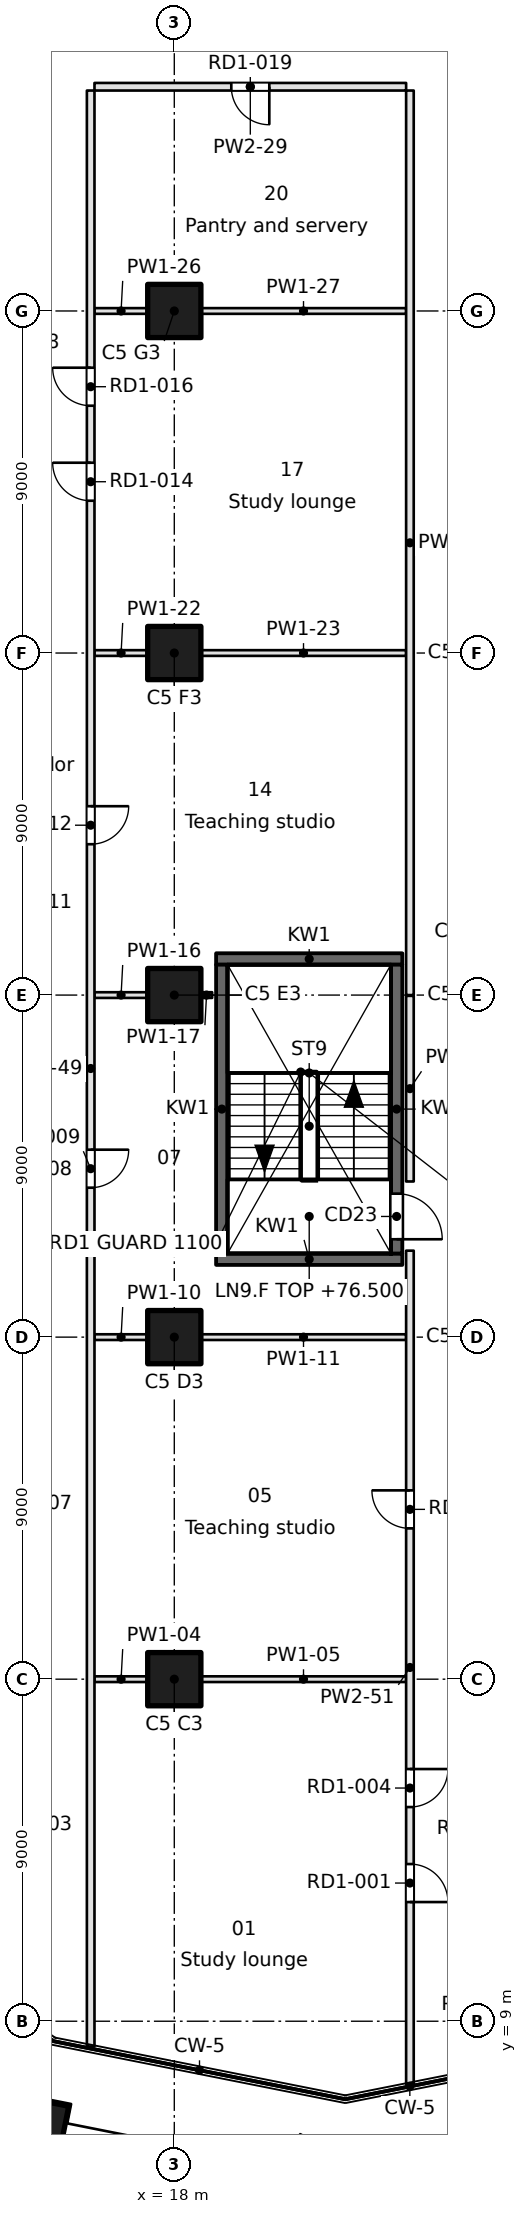
"""IFC4 building model, lengths in metres.
Left out: names, types, materials, properties, quantities, classifications, styles, units other than length and angle.
Written with IfcOpenShell. Run it as: python <this file> out.ifc"""

import sys

from ifc_helpers import new_model, si_unit, direction, frame, frame_2d, origin, origin_2d, place, context, subcontext, project, spatial, rectangle, extrude, element, fill, save


model = new_model("IFC4")
c1 = context("Model", 3, precision=1e-05, world=origin(), true_north=direction((0.0, 1.0)))
c2 = subcontext(c1, "Body", "Model", "MODEL_VIEW")
j1 = project(units=[si_unit("LENGTHUNIT", "METRE"), si_unit("PLANEANGLEUNIT", "RADIAN")], contexts=[c1])
p1 = place(None, origin())
s1 = spatial("IfcSite", under=j1, at=p1, CompositionType="ELEMENT")
p2 = place(p1, origin())
s2 = spatial("IfcBuilding", under=s1, at=p2, CompositionType="ELEMENT")
p3 = place(p2, frame((0.0, 0.0, 76.5)))
s3 = spatial("IfcBuildingStorey", under=s2, at=p3, CompositionType="ELEMENT", Elevation=76.5)
p4 = place(p3, frame((13.89, 6.213, 0.0), z_axis=(0.0, 0.0, 1.0), x_axis=(-0.980785280403, 0.195090322016, 0.0)))
e1 = element("IfcColumn", 1, at=p4, inside=s3, PredefinedType="COLUMN", context=c2, shape_type="SweptSolid", body=[
    extrude(rectangle(XDim=2.4, YDim=1.6, at=origin_2d()), origin(), (0.0, 0.0, 1.0), 3.7),
])
for number, where, z_axis, x_axis in (
    (2, (18.0, 18.0, 0.0), (0.0, 0.0, 1.0), (1.0, 0.0, 0.0)),
    (3, (18.0, 27.0, 0.0), (0.0, 0.0, 1.0), (1.0, 0.0, 0.0)),
    (4, (18.0, 36.0, 0.0), (0.0, 0.0, 1.0), (1.0, 0.0, 0.0)),
    (5, (18.0, 45.0, 0.0), (0.0, 0.0, 1.0), (1.0, 0.0, 0.0)),
    (6, (18.0, 54.0, 0.0), (0.0, 0.0, 1.0), (1.0, 0.0, 0.0)),
):
    element("IfcColumn", number, at=place(p3, frame(where, z_axis=z_axis, x_axis=x_axis)), inside=s3, PredefinedType="COLUMN", context=c2, shape_type="SweptSolid", body=[
        extrude(rectangle(XDim=1.4, YDim=1.4, at=origin_2d()), origin(), (0.0, 0.0, 1.0), 3.7),
    ])
for number, where, z_axis, x_axis in (
    (7, (19.1, 29.05, -0.4), (0.0, 0.0, 1.0), (1.0, 0.0, 0.0)),
    (8, (19.1, 36.95, -0.4), (0.0, 0.0, 1.0), (1.0, 0.0, 0.0)),
):
    element("IfcWall", number, at=place(p3, frame(where, z_axis=z_axis, x_axis=x_axis)), inside=s3, PredefinedType="SOLIDWALL", context=c2, shape_type="SweptSolid", body=[
        extrude(rectangle(XDim=4.9, YDim=0.3, at=frame_2d((2.45, 0.0))), origin(), (0.0, 0.0, 1.0), 3.65),
    ])
p5 = place(p3, frame((19.25, 29.2, -0.4), z_axis=(0.0, 0.0, 1.0), x_axis=(0.0, 1.0, 0.0)))
e9 = element("IfcWall", 9, at=p5, inside=s3, PredefinedType="SOLIDWALL", context=c2, shape_type="SweptSolid", body=[
    extrude(rectangle(XDim=7.6, YDim=0.3, at=frame_2d((3.8, 0.0))), origin(), (0.0, 0.0, 1.0), 3.65),
])
p6 = place(p3, frame((23.85, 29.2, -0.4), z_axis=(0.0, 0.0, 1.0), x_axis=(0.0, 1.0, 0.0)))
e10 = element("IfcWall", 10, at=p6, inside=s3, PredefinedType="SOLIDWALL", context=c2, shape_type="SweptSolid", body=[
    extrude(rectangle(XDim=7.6, YDim=0.3, at=frame_2d((3.8, 0.0))), origin(), (0.0, 0.0, 1.0), 3.65),
])
p7 = place(p6, frame((0.375, 0.0, 0.4)))
e11 = element("IfcOpeningElement", 11, at=p7, cuts=e10, PredefinedType="OPENING", context=c2, shape_type="SweptSolid", body=[
    extrude(rectangle(XDim=1.2, YDim=2.1, at=frame_2d((0.6, 1.05))), frame((0.0, 0.15, 0.0), z_axis=(0.0, -1.0, 0.0), x_axis=(1.0, 0.0, 0.0)), (0.0, 0.0, 1.0), 0.3),
])
p8 = place(p3, frame((15.9, 18.0, 0.0), z_axis=(0.0, 0.0, 1.0), x_axis=(1.0, 0.0, 0.0)))
e12 = element("IfcWall", 12, at=p8, inside=s3, PredefinedType="PARTITIONING", context=c2, shape_type="SweptSolid", body=[
    extrude(rectangle(XDim=1.4, YDim=0.15, at=frame_2d((0.7, 0.0))), origin(), (0.0, 0.0, 1.0), 3.25),
])
p9 = place(p3, frame((18.7, 18.0, 0.0), z_axis=(0.0, 0.0, 1.0), x_axis=(1.0, 0.0, 0.0)))
e13 = element("IfcWall", 13, at=p9, inside=s3, PredefinedType="PARTITIONING", context=c2, shape_type="SweptSolid", body=[
    extrude(rectangle(XDim=5.4, YDim=0.15, at=frame_2d((2.7, 0.0))), origin(), (0.0, 0.0, 1.0), 3.25),
])
p10 = place(p3, frame((15.9, 27.0, 0.0), z_axis=(0.0, 0.0, 1.0), x_axis=(1.0, 0.0, 0.0)))
e14 = element("IfcWall", 14, at=p10, inside=s3, PredefinedType="PARTITIONING", context=c2, shape_type="SweptSolid", body=[
    extrude(rectangle(XDim=1.4, YDim=0.15, at=frame_2d((0.7, 0.0))), origin(), (0.0, 0.0, 1.0), 3.25),
])
p11 = place(p3, frame((18.7, 27.0, 0.0), z_axis=(0.0, 0.0, 1.0), x_axis=(1.0, 0.0, 0.0)))
e15 = element("IfcWall", 15, at=p11, inside=s3, PredefinedType="PARTITIONING", context=c2, shape_type="SweptSolid", body=[
    extrude(rectangle(XDim=5.4, YDim=0.15, at=frame_2d((2.7, 0.0))), origin(), (0.0, 0.0, 1.0), 3.25),
])
p12 = place(p3, frame((15.9, 36.0, 0.0), z_axis=(0.0, 0.0, 1.0), x_axis=(1.0, 0.0, 0.0)))
e16 = element("IfcWall", 16, at=p12, inside=s3, PredefinedType="PARTITIONING", context=c2, shape_type="SweptSolid", body=[
    extrude(rectangle(XDim=1.4, YDim=0.15, at=frame_2d((0.7, 0.0))), origin(), (0.0, 0.0, 1.0), 3.25),
])
p13 = place(p3, frame((18.7, 36.0, 0.0), z_axis=(0.0, 0.0, 1.0), x_axis=(1.0, 0.0, 0.0)))
e17 = element("IfcWall", 17, at=p13, inside=s3, PredefinedType="PARTITIONING", context=c2, shape_type="SweptSolid", body=[
    extrude(rectangle(XDim=0.296, YDim=0.15, at=frame_2d((0.148, 0.0))), origin(), (0.0, 0.0, 1.0), 3.25),
])
p14 = place(p3, frame((15.9, 45.0, 0.0), z_axis=(0.0, 0.0, 1.0), x_axis=(1.0, 0.0, 0.0)))
e18 = element("IfcWall", 18, at=p14, inside=s3, PredefinedType="PARTITIONING", context=c2, shape_type="SweptSolid", body=[
    extrude(rectangle(XDim=1.4, YDim=0.15, at=frame_2d((0.7, 0.0))), origin(), (0.0, 0.0, 1.0), 3.25),
])
p15 = place(p3, frame((18.7, 45.0, 0.0), z_axis=(0.0, 0.0, 1.0), x_axis=(1.0, 0.0, 0.0)))
e19 = element("IfcWall", 19, at=p15, inside=s3, PredefinedType="PARTITIONING", context=c2, shape_type="SweptSolid", body=[
    extrude(rectangle(XDim=5.4, YDim=0.15, at=frame_2d((2.7, 0.0))), origin(), (0.0, 0.0, 1.0), 3.25),
])
p16 = place(p3, frame((15.9, 54.0, 0.0), z_axis=(0.0, 0.0, 1.0), x_axis=(1.0, 0.0, 0.0)))
e20 = element("IfcWall", 20, at=p16, inside=s3, PredefinedType="PARTITIONING", context=c2, shape_type="SweptSolid", body=[
    extrude(rectangle(XDim=1.4, YDim=0.15, at=frame_2d((0.7, 0.0))), origin(), (0.0, 0.0, 1.0), 3.25),
])
p17 = place(p3, frame((18.7, 54.0, 0.0), z_axis=(0.0, 0.0, 1.0), x_axis=(1.0, 0.0, 0.0)))
e21 = element("IfcWall", 21, at=p17, inside=s3, PredefinedType="PARTITIONING", context=c2, shape_type="SweptSolid", body=[
    extrude(rectangle(XDim=5.4, YDim=0.15, at=frame_2d((2.7, 0.0))), origin(), (0.0, 0.0, 1.0), 3.25),
])
p18 = place(p3, frame((24.1, 59.9, 0.0), z_axis=(0.0, 0.0, 1.0), x_axis=(-1.0, 0.0, 0.0)))
e22 = element("IfcWall", 22, at=p18, inside=s3, PredefinedType="PARTITIONING", context=c2, shape_type="SweptSolid", body=[
    extrude(rectangle(XDim=8.2, YDim=0.2, at=frame_2d((4.1, 0.0))), origin(), (0.0, 0.0, 1.0), 3.25),
])
p19 = place(p18, frame((3.6, 0.0, 0.0)))
e23 = element("IfcOpeningElement", 23, at=p19, cuts=e22, PredefinedType="OPENING", context=c2, shape_type="SweptSolid", body=[
    extrude(rectangle(XDim=1.0, YDim=2.1, at=frame_2d((0.5, 1.05))), frame((0.0, 0.1, 0.0), z_axis=(0.0, -1.0, 0.0), x_axis=(1.0, 0.0, 0.0)), (0.0, 0.0, 1.0), 0.2),
])
p20 = place(p3, frame((15.8, 59.8, 0.0), z_axis=(0.0, 0.0, 1.0), x_axis=(0.0, -1.0, 0.0)))
e24 = element("IfcWall", 24, at=p20, inside=s3, PredefinedType="PARTITIONING", context=c2, shape_type="SweptSolid", body=[
    extrude(rectangle(XDim=51.464, YDim=0.2, at=frame_2d((25.732, 0.0))), origin(), (0.0, 0.0, 1.0), 3.25),
])
p21 = place(p20, frame((27.868, 0.0, 0.0)))
e25 = element("IfcOpeningElement", 25, at=p21, cuts=e24, PredefinedType="OPENING", context=c2, shape_type="SweptSolid", body=[
    extrude(rectangle(XDim=1.0, YDim=2.1, at=frame_2d((0.5, 1.05))), frame((0.0, 0.1, 0.0), z_axis=(0.0, -1.0, 0.0), x_axis=(1.0, 0.0, 0.0)), (0.0, 0.0, 1.0), 0.2),
])
p22 = place(p20, frame((18.831, 0.0, 0.0)))
e26 = element("IfcOpeningElement", 26, at=p22, cuts=e24, PredefinedType="OPENING", context=c2, shape_type="SweptSolid", body=[
    extrude(rectangle(XDim=1.0, YDim=2.1, at=frame_2d((0.5, 1.05))), frame((0.0, 0.1, 0.0), z_axis=(0.0, -1.0, 0.0), x_axis=(1.0, 0.0, 0.0)), (0.0, 0.0, 1.0), 0.2),
])
p23 = place(p20, frame((9.793, 0.0, 0.0)))
e27 = element("IfcOpeningElement", 27, at=p23, cuts=e24, PredefinedType="OPENING", context=c2, shape_type="SweptSolid", body=[
    extrude(rectangle(XDim=1.0, YDim=2.1, at=frame_2d((0.5, 1.05))), frame((0.0, 0.1, 0.0), z_axis=(0.0, -1.0, 0.0), x_axis=(1.0, 0.0, 0.0)), (0.0, 0.0, 1.0), 0.2),
])
p24 = place(p20, frame((7.293, 0.0, 0.0)))
e28 = element("IfcOpeningElement", 28, at=p24, cuts=e24, PredefinedType="OPENING", context=c2, shape_type="SweptSolid", body=[
    extrude(rectangle(XDim=1.0, YDim=2.1, at=frame_2d((0.5, 1.05))), frame((0.0, 0.1, 0.0), z_axis=(0.0, -1.0, 0.0), x_axis=(1.0, 0.0, 0.0)), (0.0, 0.0, 1.0), 0.2),
])
p25 = place(p3, frame((24.2, 31.095, 0.0), z_axis=(0.0, 0.0, 1.0), x_axis=(0.0, 1.0, 0.0)))
e29 = element("IfcWall", 29, at=p25, inside=s3, PredefinedType="PARTITIONING", context=c2, shape_type="SweptSolid", body=[
    extrude(rectangle(XDim=4.884, YDim=0.2, at=frame_2d((2.442, 0.0))), origin(), (0.0, 0.0, 1.0), 3.25),
])
p26 = place(p3, frame((24.2, 7.341, 0.0), z_axis=(0.0, 0.0, 1.0), x_axis=(0.0, 1.0, 0.0)))
e30 = element("IfcWall", 30, at=p26, inside=s3, PredefinedType="PARTITIONING", context=c2, shape_type="SweptSolid", body=[
    extrude(rectangle(XDim=21.934, YDim=0.2, at=frame_2d((10.967, 0.0))), origin(), (0.0, 0.0, 1.0), 3.25),
])
p27 = place(p26, frame((4.794, 0.0, 0.0)))
e31 = element("IfcOpeningElement", 31, at=p27, cuts=e30, PredefinedType="OPENING", context=c2, shape_type="SweptSolid", body=[
    extrude(rectangle(XDim=1.0, YDim=2.1, at=frame_2d((0.5, 1.05))), frame((0.0, 0.1, 0.0), z_axis=(0.0, -1.0, 0.0), x_axis=(1.0, 0.0, 0.0)), (0.0, 0.0, 1.0), 0.2),
])
p28 = place(p26, frame((7.294, 0.0, 0.0)))
e32 = element("IfcOpeningElement", 32, at=p28, cuts=e30, PredefinedType="OPENING", context=c2, shape_type="SweptSolid", body=[
    extrude(rectangle(XDim=1.0, YDim=2.1, at=frame_2d((0.5, 1.05))), frame((0.0, 0.1, 0.0), z_axis=(0.0, -1.0, 0.0), x_axis=(1.0, 0.0, 0.0)), (0.0, 0.0, 1.0), 0.2),
])
p29 = place(p26, frame((14.627, 0.0, 0.0)))
e33 = element("IfcOpeningElement", 33, at=p29, cuts=e30, PredefinedType="OPENING", context=c2, shape_type="SweptSolid", body=[
    extrude(rectangle(XDim=1.0, YDim=2.1, at=frame_2d((0.5, 1.05))), frame((0.0, 0.1, 0.0), z_axis=(0.0, -1.0, 0.0), x_axis=(1.0, 0.0, 0.0)), (0.0, 0.0, 1.0), 0.2),
])
p30 = place(p3, frame((24.2, 36.0, 0.0), z_axis=(0.0, 0.0, 1.0), x_axis=(0.0, 1.0, 0.0)))
e34 = element("IfcWall", 34, at=p30, inside=s3, PredefinedType="PARTITIONING", context=c2, shape_type="SweptSolid", body=[
    extrude(rectangle(XDim=23.8, YDim=0.2, at=frame_2d((11.9, 0.0))), origin(), (0.0, 0.0, 1.0), 3.25),
])
p31 = place(p7, frame((1.2, 0.0, 0.0), z_axis=(0.0, 0.0, 1.0), x_axis=(-1.0, 0.0, 0.0)))
e35 = element("IfcDoor", 35, at=p31, inside=s3, OperationType="SINGLE_SWING_RIGHT", PredefinedType="DOOR", context=c2, shape_type="SweptSolid", body=[
    extrude(rectangle(XDim=1.2, YDim=2.1, at=frame_2d((0.6, 1.05))), frame((0.0, 0.025, 0.0), z_axis=(0.0, -1.0, 0.0), x_axis=(1.0, 0.0, 0.0)), (0.0, 0.0, 1.0), 0.05),
])
fill(e11, e35)
p32 = place(p27, frame((1.0, 0.0, 0.0), z_axis=(0.0, 0.0, 1.0), x_axis=(-1.0, 0.0, 0.0)))
e36 = element("IfcDoor", 36, at=p32, inside=s3, OperationType="SINGLE_SWING_RIGHT", PredefinedType="DOOR", context=c2, shape_type="SweptSolid", body=[
    extrude(rectangle(XDim=1.0, YDim=2.1, at=frame_2d((0.5, 1.05))), frame((0.0, 0.025, 0.0), z_axis=(0.0, -1.0, 0.0), x_axis=(1.0, 0.0, 0.0)), (0.0, 0.0, 1.0), 0.05),
])
fill(e31, e36)
p33 = place(p28, frame((1.0, 0.0, 0.0), z_axis=(0.0, 0.0, 1.0), x_axis=(-1.0, 0.0, 0.0)))
e37 = element("IfcDoor", 37, at=p33, inside=s3, OperationType="SINGLE_SWING_LEFT", PredefinedType="DOOR", context=c2, shape_type="SweptSolid", body=[
    extrude(rectangle(XDim=1.0, YDim=2.1, at=frame_2d((0.5, 1.05))), frame((0.0, 0.025, 0.0), z_axis=(0.0, -1.0, 0.0), x_axis=(1.0, 0.0, 0.0)), (0.0, 0.0, 1.0), 0.05),
])
fill(e32, e37)
p34 = place(p29, origin())
e38 = element("IfcDoor", 38, at=p34, inside=s3, OperationType="SINGLE_SWING_RIGHT", PredefinedType="DOOR", context=c2, shape_type="SweptSolid", body=[
    extrude(rectangle(XDim=1.0, YDim=2.1, at=frame_2d((0.5, 1.05))), frame((0.0, 0.025, 0.0), z_axis=(0.0, -1.0, 0.0), x_axis=(1.0, 0.0, 0.0)), (0.0, 0.0, 1.0), 0.05),
])
fill(e33, e38)
p35 = place(p21, origin())
e39 = element("IfcDoor", 39, at=p35, inside=s3, OperationType="SINGLE_SWING_LEFT", PredefinedType="DOOR", context=c2, shape_type="SweptSolid", body=[
    extrude(rectangle(XDim=1.0, YDim=2.1, at=frame_2d((0.5, 1.05))), frame((0.0, 0.025, 0.0), z_axis=(0.0, -1.0, 0.0), x_axis=(1.0, 0.0, 0.0)), (0.0, 0.0, 1.0), 0.05),
])
fill(e25, e39)
p36 = place(p22, origin())
e40 = element("IfcDoor", 40, at=p36, inside=s3, OperationType="SINGLE_SWING_LEFT", PredefinedType="DOOR", context=c2, shape_type="SweptSolid", body=[
    extrude(rectangle(XDim=1.0, YDim=2.1, at=frame_2d((0.5, 1.05))), frame((0.0, 0.025, 0.0), z_axis=(0.0, -1.0, 0.0), x_axis=(1.0, 0.0, 0.0)), (0.0, 0.0, 1.0), 0.05),
])
fill(e26, e40)
p37 = place(p23, frame((1.0, 0.0, 0.0), z_axis=(0.0, 0.0, 1.0), x_axis=(-1.0, 0.0, 0.0)))
e41 = element("IfcDoor", 41, at=p37, inside=s3, OperationType="SINGLE_SWING_RIGHT", PredefinedType="DOOR", context=c2, shape_type="SweptSolid", body=[
    extrude(rectangle(XDim=1.0, YDim=2.1, at=frame_2d((0.5, 1.05))), frame((0.0, 0.025, 0.0), z_axis=(0.0, -1.0, 0.0), x_axis=(1.0, 0.0, 0.0)), (0.0, 0.0, 1.0), 0.05),
])
fill(e27, e41)
p38 = place(p24, frame((1.0, 0.0, 0.0), z_axis=(0.0, 0.0, 1.0), x_axis=(-1.0, 0.0, 0.0)))
e42 = element("IfcDoor", 42, at=p38, inside=s3, OperationType="SINGLE_SWING_RIGHT", PredefinedType="DOOR", context=c2, shape_type="SweptSolid", body=[
    extrude(rectangle(XDim=1.0, YDim=2.1, at=frame_2d((0.5, 1.05))), frame((0.0, 0.025, 0.0), z_axis=(0.0, -1.0, 0.0), x_axis=(1.0, 0.0, 0.0)), (0.0, 0.0, 1.0), 0.05),
])
fill(e28, e42)
p39 = place(p19, origin())
e43 = element("IfcDoor", 43, at=p39, inside=s3, OperationType="SINGLE_SWING_LEFT", PredefinedType="DOOR", context=c2, shape_type="SweptSolid", body=[
    extrude(rectangle(XDim=1.0, YDim=2.1, at=frame_2d((0.5, 1.05))), frame((0.0, 0.025, 0.0), z_axis=(0.0, -1.0, 0.0), x_axis=(1.0, 0.0, 0.0)), (0.0, 0.0, 1.0), 0.05),
])
fill(e23, e43)
save(model, sys.argv[1])
